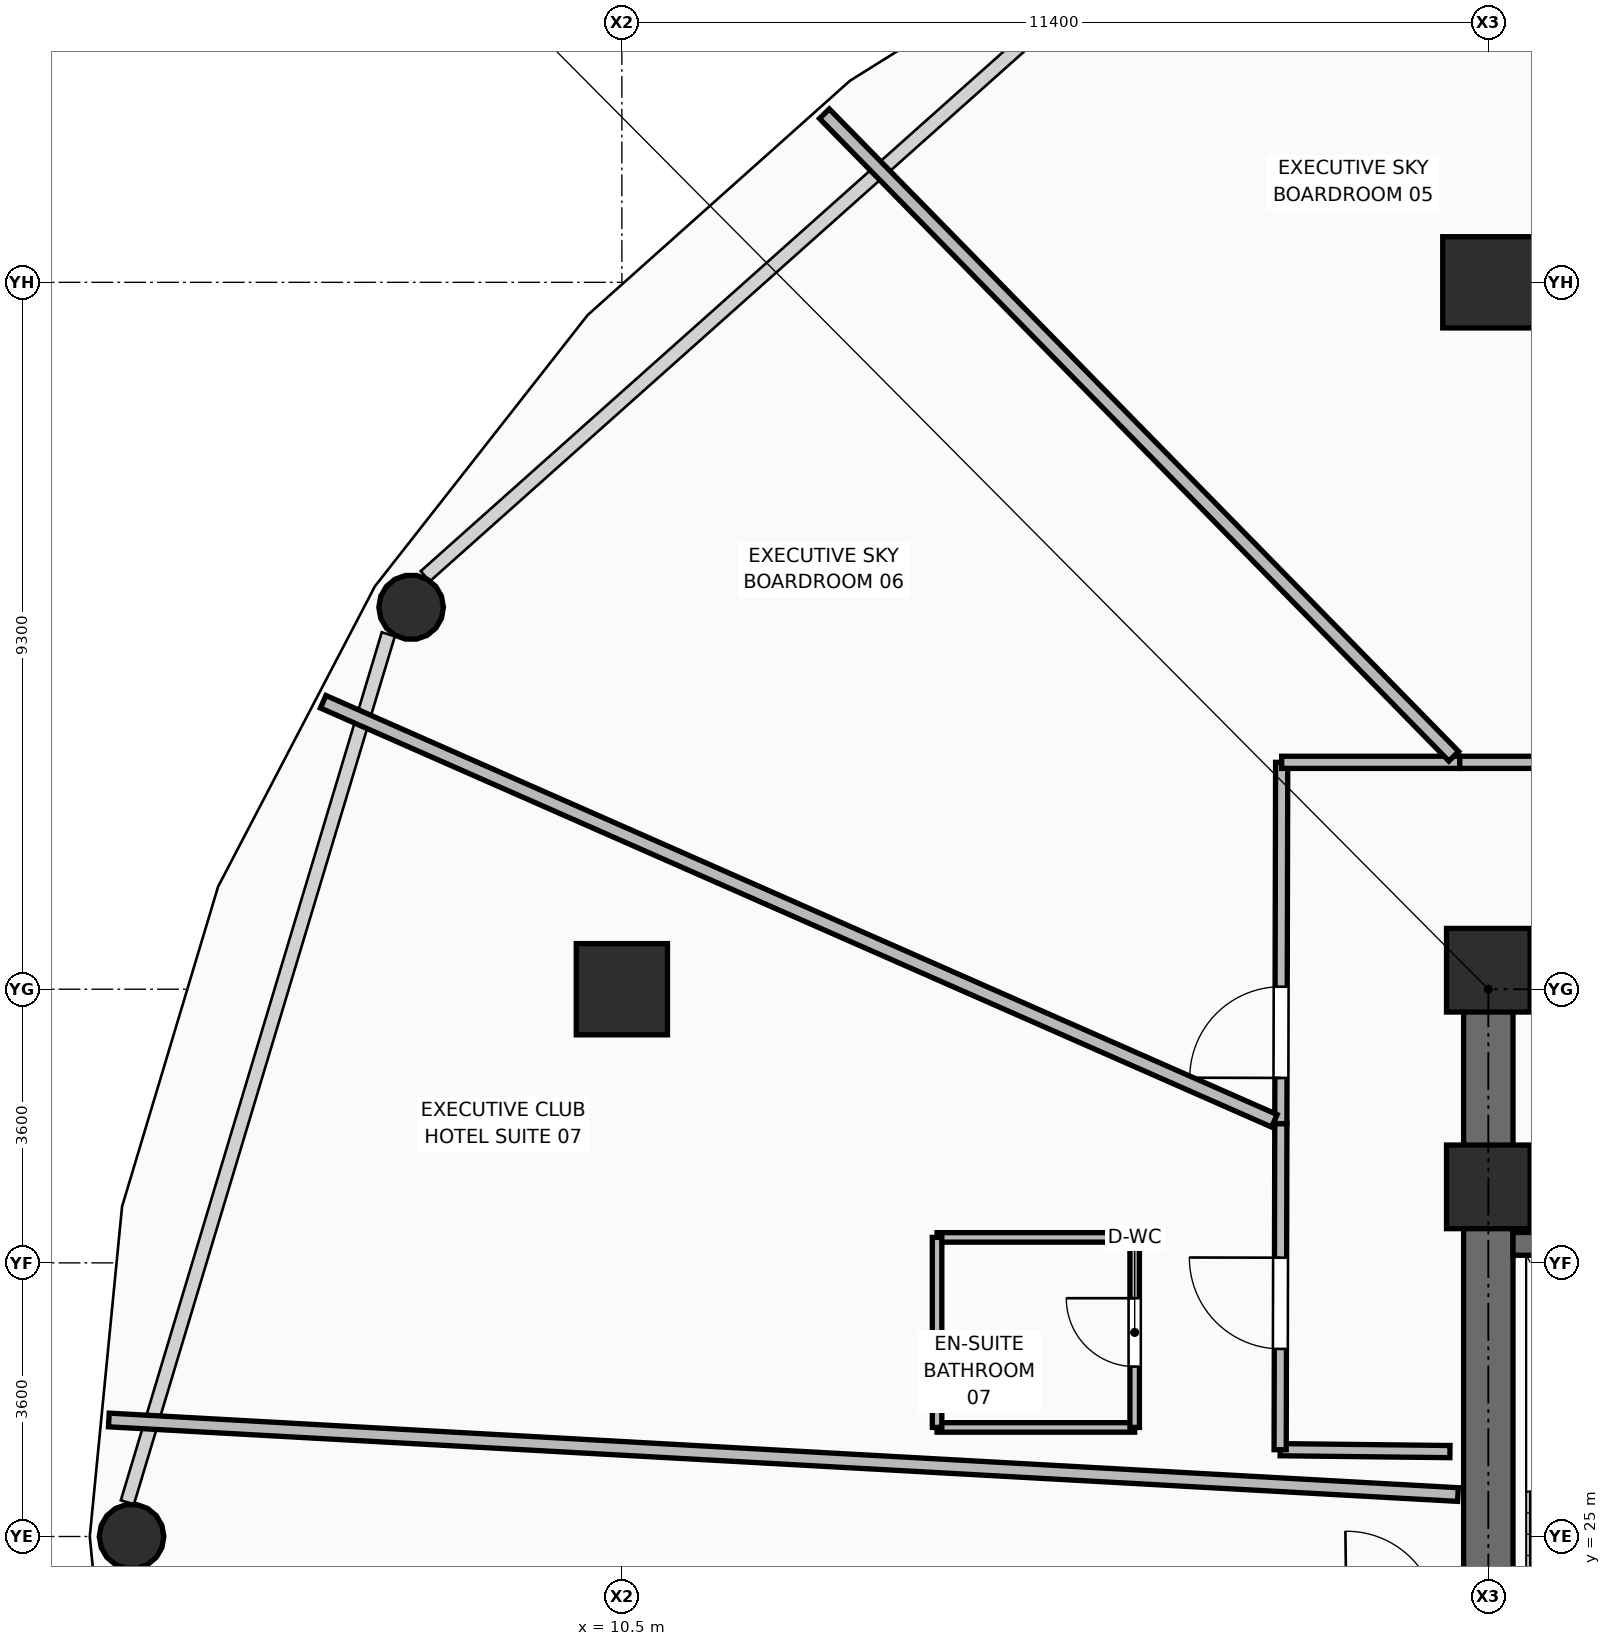
"""IFC4 building model, lengths in metres.
Left out: names, types, materials, properties, quantities, classifications, styles, units other than length and angle.
Written with IfcOpenShell. Run it as: python <this file> out.ifc"""

import sys

from ifc_helpers import new_model, si_unit, direction, frame, frame_2d, origin, origin_2d, place, context, subcontext, project, spatial, rectangle, hollow_rectangle, hollow_circle, extrude, element, fill, save


model = new_model("IFC4")
c1 = context("Model", 3, precision=1e-05, world=origin(), true_north=direction((0.0, 1.0)))
c2 = subcontext(c1, "Body", "Model", "MODEL_VIEW")
j1 = project(units=[si_unit("LENGTHUNIT", "METRE"), si_unit("PLANEANGLEUNIT", "RADIAN")], contexts=[c1])
p1 = place(None, origin())
s1 = spatial("IfcSite", under=j1, at=p1, CompositionType="ELEMENT")
p2 = place(p1, origin())
s2 = spatial("IfcBuilding", under=s1, at=p2, CompositionType="ELEMENT")
p3 = place(p2, frame((0.0, 0.0, 60.75)))
s3 = spatial("IfcBuildingStorey", under=s2, at=p3, CompositionType="ELEMENT", Elevation=60.75)
for number, where, z_axis, x_axis in (
    (1, (21.9, 29.6, 0.0), (0.0, 0.0, 1.0), (1.0, 0.0, 0.0)),
    (2, (21.9, 32.45, 0.0), (0.0, 0.0, 1.0), (1.0, 0.0, 0.0)),
):
    element("IfcColumn", number, at=place(p3, frame(where, z_axis=z_axis, x_axis=x_axis)), inside=s3, PredefinedType="COLUMN", context=c2, shape_type="SweptSolid", body=[
        extrude(rectangle(XDim=1.1, YDim=1.1, at=origin_2d()), origin(), (0.0, 0.0, 1.0), 3.75),
    ])
for number, where, z_axis, x_axis in (
    (3, (10.5, 32.2, 0.0), (0.0, 0.0, 1.0), (1.0, 0.0, 0.0)),
    (4, (21.9, 41.5, 0.0), (0.0, 0.0, 1.0), (1.0, 0.0, 0.0)),
):
    element("IfcColumn", number, at=place(p3, frame(where, z_axis=z_axis, x_axis=x_axis)), inside=s3, PredefinedType="COLUMN", context=c2, shape_type="SweptSolid", body=[
        extrude(hollow_rectangle(XDim=1.2, YDim=1.2, WallThickness=0.045, at=origin_2d()), origin(), (0.0, 0.0, 1.0), 3.75),
    ])
for number, where, z_axis, x_axis in (
    (5, (7.727, 37.225, 0.0), (0.0, 0.0, 1.0), (1.0, 0.0, 0.0)),
    (6, (4.049, 25.0, 0.0), (0.0, 0.0, 1.0), (1.0, 0.0, 0.0)),
):
    element("IfcColumn", number, at=place(p3, frame(where, z_axis=z_axis, x_axis=x_axis)), inside=s3, PredefinedType="COLUMN", context=c2, shape_type="SweptSolid", body=[
        extrude(hollow_circle(Radius=0.425, WallThickness=0.04, at=origin_2d()), origin(), (0.0, 0.0, 1.0), 3.57),
    ])
p4 = place(p3, frame((21.575, 32.45, 0.0), z_axis=(0.0, 0.0, 1.0), x_axis=(1.0, 0.0, 0.0)))
e7 = element("IfcWall", 7, at=p4, inside=s3, PredefinedType="SHEAR", context=c2, shape_type="SweptSolid", body=[
    extrude(rectangle(XDim=19.85, YDim=0.65, at=frame_2d((9.925, 0.0))), origin(), (0.0, 0.0, 1.0), 3.57),
])
p5 = place(p4, frame((2.175, 0.0, 0.0)))
e8 = element("IfcOpeningElement", 8, at=p5, cuts=e7, PredefinedType="OPENING", context=c2, shape_type="SweptSolid", body=[
    extrude(rectangle(XDim=1.1, YDim=2.1, at=frame_2d((0.55, 1.05))), frame((0.0, 0.335, 0.0), z_axis=(0.0, -1.0, 0.0), x_axis=(1.0, 0.0, 0.0)), (0.0, 0.0, 1.0), 0.67),
])
p6 = place(p4, frame((15.565, 0.0, 0.0)))
e9 = element("IfcOpeningElement", 9, at=p6, cuts=e7, PredefinedType="OPENING", context=c2, shape_type="SweptSolid", body=[
    extrude(rectangle(XDim=1.0, YDim=2.1, at=frame_2d((0.5, 1.05))), frame((0.0, 0.335, 0.0), z_axis=(0.0, -1.0, 0.0), x_axis=(1.0, 0.0, 0.0)), (0.0, 0.0, 1.0), 0.67),
])
p7 = place(p4, frame((17.575, 0.0, 0.0)))
e10 = element("IfcOpeningElement", 10, at=p7, cuts=e7, PredefinedType="OPENING", context=c2, shape_type="SweptSolid", body=[
    extrude(rectangle(XDim=0.9, YDim=2.1, at=frame_2d((0.45, 1.05))), frame((0.0, 0.335, 0.0), z_axis=(0.0, -1.0, 0.0), x_axis=(1.0, 0.0, 0.0)), (0.0, 0.0, 1.0), 0.67),
])
p8 = place(p3, frame((21.9, 18.125, 0.0), z_axis=(0.0, 0.0, 1.0), x_axis=(0.0, 1.0, 0.0)))
e11 = element("IfcWall", 11, at=p8, inside=s3, PredefinedType="SHEAR", context=c2, shape_type="SweptSolid", body=[
    extrude(rectangle(XDim=14.0, YDim=0.65, at=frame_2d((7.0, 0.0))), origin(), (0.0, 0.0, 1.0), 3.57),
])
p9 = place(p3, frame((22.225, 28.85, 0.0), z_axis=(0.0, 0.0, 1.0), x_axis=(1.0, 0.0, 0.0)))
e12 = element("IfcWall", 12, at=p9, inside=s3, PredefinedType="SHEAR", context=c2, shape_type="SweptSolid", body=[
    extrude(rectangle(XDim=3.515, YDim=0.3, at=frame_2d((1.757, 0.0))), origin(), (0.0, 0.0, 1.0), 3.57),
])
p10 = place(p3, frame((21.395, 26.117, 0.0), z_axis=(0.0, 0.0, 1.0), x_axis=(-0.999936661747, 0.011254887571, 0.0)))
e13 = element("IfcWall", 13, at=p10, inside=s3, PredefinedType="PARTITIONING", context=c2, shape_type="SweptSolid", body=[
    extrude(rectangle(XDim=2.234, YDim=0.16, at=frame_2d((1.117, 0.0))), origin(), (0.0, 0.0, 1.0), 3.55),
])
p11 = place(p3, frame((19.161, 26.142, 0.0), z_axis=(0.0, 0.0, 1.0), x_axis=(0.002105737748, 0.999997782932, 0.0)))
e14 = element("IfcWall", 14, at=p11, inside=s3, PredefinedType="PARTITIONING", context=c2, shape_type="SweptSolid", body=[
    extrude(rectangle(XDim=4.29, YDim=0.16, at=frame_2d((2.145, 0.0))), origin(), (0.0, 0.0, 1.0), 3.55),
])
p12 = place(p11, frame((1.326, 0.0, 0.0)))
e15 = element("IfcOpeningElement", 15, at=p12, cuts=e14, PredefinedType="OPENING", context=c2, shape_type="SweptSolid", body=[
    extrude(rectangle(XDim=1.2, YDim=2.1, at=frame_2d((0.6, 1.05))), frame((0.0, 0.09, 0.0), z_axis=(0.0, -1.0, 0.0), x_axis=(1.0, 0.0, 0.0)), (0.0, 0.0, 1.0), 0.18),
])
p13 = place(p3, frame((19.17, 30.432, 0.0), z_axis=(0.0, 0.0, 1.0), x_axis=(0.002311360614, 0.999997328802, 0.0)))
e16 = element("IfcWall", 16, at=p13, inside=s3, PredefinedType="PARTITIONING", context=c2, shape_type="SweptSolid", body=[
    extrude(rectangle(XDim=4.753, YDim=0.16, at=frame_2d((2.376, 0.0))), origin(), (0.0, 0.0, 1.0), 2.928),
])
p14 = place(p13, frame((0.601, 0.0, 0.0)))
e17 = element("IfcOpeningElement", 17, at=p14, cuts=e16, PredefinedType="OPENING", context=c2, shape_type="SweptSolid", body=[
    extrude(rectangle(XDim=1.2, YDim=2.1, at=frame_2d((0.6, 1.05))), frame((0.0, 0.09, 0.0), z_axis=(0.0, -1.0, 0.0), x_axis=(1.0, 0.0, 0.0)), (0.0, 0.0, 1.0), 0.18),
])
p15 = place(p3, frame((19.181, 35.185, 0.0), z_axis=(0.0, 0.0, 1.0), x_axis=(1.0, 0.0, 0.0)))
e18 = element("IfcWall", 18, at=p15, inside=s3, PredefinedType="PARTITIONING", context=c2, shape_type="SweptSolid", body=[
    extrude(rectangle(XDim=2.343, YDim=0.16, at=frame_2d((1.171, 0.0))), origin(), (0.0, 0.0, 1.0), 2.928),
])
p16 = place(p3, frame((21.524, 35.185, 0.0), z_axis=(0.0, 0.0, 1.0), x_axis=(1.0, 0.0, 0.0)))
e19 = element("IfcWall", 19, at=p16, inside=s3, PredefinedType="PARTITIONING", context=c2, shape_type="SweptSolid", body=[
    extrude(rectangle(XDim=6.093, YDim=0.16, at=frame_2d((3.046, 0.0))), origin(), (0.0, 0.0, 1.0), 3.55),
])
p17 = place(p16, frame((2.373, 0.0, 0.0)))
e20 = element("IfcOpeningElement", 20, at=p17, cuts=e19, PredefinedType="OPENING", context=c2, shape_type="SweptSolid", body=[
    extrude(rectangle(XDim=1.2, YDim=2.1, at=frame_2d((0.6, 1.05))), frame((0.0, 0.09, 0.0), z_axis=(0.0, -1.0, 0.0), x_axis=(1.0, 0.0, 0.0)), (0.0, 0.0, 1.0), 0.18),
])
p18 = place(p3, frame((27.587, 35.265, 0.0), z_axis=(0.0, 0.0, 1.0), x_axis=(-0.356216214418, 0.93440355767, 0.0)))
e21 = element("IfcWall", 21, at=p18, inside=s3, PredefinedType="PARTITIONING", context=c2, shape_type="SweptSolid", body=[
    extrude(rectangle(XDim=14.202, YDim=0.18, at=frame_2d((7.101, 0.0))), origin(), (0.0, 0.0, 1.0), 2.775),
])
p19 = place(p3, frame((21.445, 35.265, 0.0), z_axis=(0.0, 0.0, 1.0), x_axis=(-0.699754693744, 0.714383208498, 0.0)))
e22 = element("IfcWall", 22, at=p19, inside=s3, PredefinedType="PARTITIONING", context=c2, shape_type="SweptSolid", body=[
    extrude(rectangle(XDim=11.833, YDim=0.18, at=frame_2d((5.917, 0.0))), origin(), (0.0, 0.0, 1.0), 2.775),
])
p20 = place(p3, frame((19.085, 30.469, 0.0), z_axis=(0.0, 0.0, 1.0), x_axis=(-0.915142788341, 0.403129851223, 0.0)))
e23 = element("IfcWall", 23, at=p20, inside=s3, PredefinedType="PARTITIONING", context=c2, shape_type="SweptSolid", body=[
    extrude(rectangle(XDim=13.675, YDim=0.18, at=frame_2d((6.838, 0.0))), origin(), (0.0, 0.0, 1.0), 2.775),
])
p21 = place(p3, frame((21.5, 25.552, 0.0), z_axis=(0.0, 0.0, 1.0), x_axis=(-0.998476368936, 0.055180981107, 0.0)))
e24 = element("IfcWall", 24, at=p21, inside=s3, PredefinedType="PARTITIONING", context=c2, shape_type="SweptSolid", body=[
    extrude(rectangle(XDim=17.777, YDim=0.18, at=frame_2d((8.889, 0.0))), origin(), (0.0, 0.0, 1.0), 2.595),
])
for number, where, z_axis, x_axis in (
    (25, (14.647, 26.435, 0.0), (0.0, 0.0, 1.0), (1.0, 0.0, 0.0)),
    (26, (14.647, 28.935, 0.0), (0.0, 0.0, 1.0), (1.0, 0.0, 0.0)),
):
    element("IfcWall", number, at=place(p3, frame(where, z_axis=z_axis, x_axis=x_axis)), inside=s3, PredefinedType="PARTITIONING", context=c2, shape_type="SweptSolid", body=[
        extrude(rectangle(XDim=2.6, YDim=0.125, at=frame_2d((1.3, 0.0))), origin(), (0.0, 0.0, 1.0), 3.55),
    ])
p22 = place(p3, frame((14.647, 26.435, 0.0), z_axis=(0.0, 0.0, 1.0), x_axis=(0.0, 1.0, 0.0)))
e27 = element("IfcWall", 27, at=p22, inside=s3, PredefinedType="PARTITIONING", context=c2, shape_type="SweptSolid", body=[
    extrude(rectangle(XDim=2.5, YDim=0.125, at=frame_2d((1.25, 0.0))), origin(), (0.0, 0.0, 1.0), 3.55),
])
p23 = place(p3, frame((17.247, 26.435, 0.0), z_axis=(0.0, 0.0, 1.0), x_axis=(0.0, 1.0, 0.0)))
e28 = element("IfcWall", 28, at=p23, inside=s3, PredefinedType="PARTITIONING", context=c2, shape_type="SweptSolid", body=[
    extrude(rectangle(XDim=2.5, YDim=0.125, at=frame_2d((1.25, 0.0))), origin(), (0.0, 0.0, 1.0), 3.55),
])
p24 = place(p23, frame((0.8, 0.0, 0.0)))
e29 = element("IfcOpeningElement", 29, at=p24, cuts=e28, PredefinedType="OPENING", context=c2, shape_type="SweptSolid", body=[
    extrude(rectangle(XDim=0.9, YDim=2.1, at=frame_2d((0.45, 1.05))), frame((0.0, 0.073, 0.0), z_axis=(0.0, -1.0, 0.0), x_axis=(1.0, 0.0, 0.0)), (0.0, 0.0, 1.0), 0.145),
])
p25 = place(p14, origin())
e30 = element("IfcDoor", 30, at=p25, inside=s3, OperationType="SINGLE_SWING_LEFT", PredefinedType="DOOR", context=c2, shape_type="SweptSolid", body=[
    extrude(rectangle(XDim=1.2, YDim=2.1, at=frame_2d((0.6, 1.05))), frame((0.0, 0.025, 0.0), z_axis=(0.0, -1.0, 0.0), x_axis=(1.0, 0.0, 0.0)), (0.0, 0.0, 1.0), 0.05),
])
fill(e17, e30)
p26 = place(p24, origin())
e31 = element("IfcDoor", 31, at=p26, inside=s3, OperationType="SINGLE_SWING_RIGHT", PredefinedType="DOOR", context=c2, shape_type="SweptSolid", body=[
    extrude(rectangle(XDim=0.9, YDim=2.1, at=frame_2d((0.45, 1.05))), frame((0.0, 0.025, 0.0), z_axis=(0.0, -1.0, 0.0), x_axis=(1.0, 0.0, 0.0)), (0.0, 0.0, 1.0), 0.05),
])
fill(e29, e31)
p27 = place(p12, origin())
e32 = element("IfcDoor", 32, at=p27, inside=s3, OperationType="SINGLE_SWING_RIGHT", PredefinedType="DOOR", context=c2, shape_type="SweptSolid", body=[
    extrude(rectangle(XDim=1.2, YDim=2.1, at=frame_2d((0.6, 1.05))), frame((0.0, 0.025, 0.0), z_axis=(0.0, -1.0, 0.0), x_axis=(1.0, 0.0, 0.0)), (0.0, 0.0, 1.0), 0.05),
])
fill(e15, e32)
save(model, sys.argv[1])
